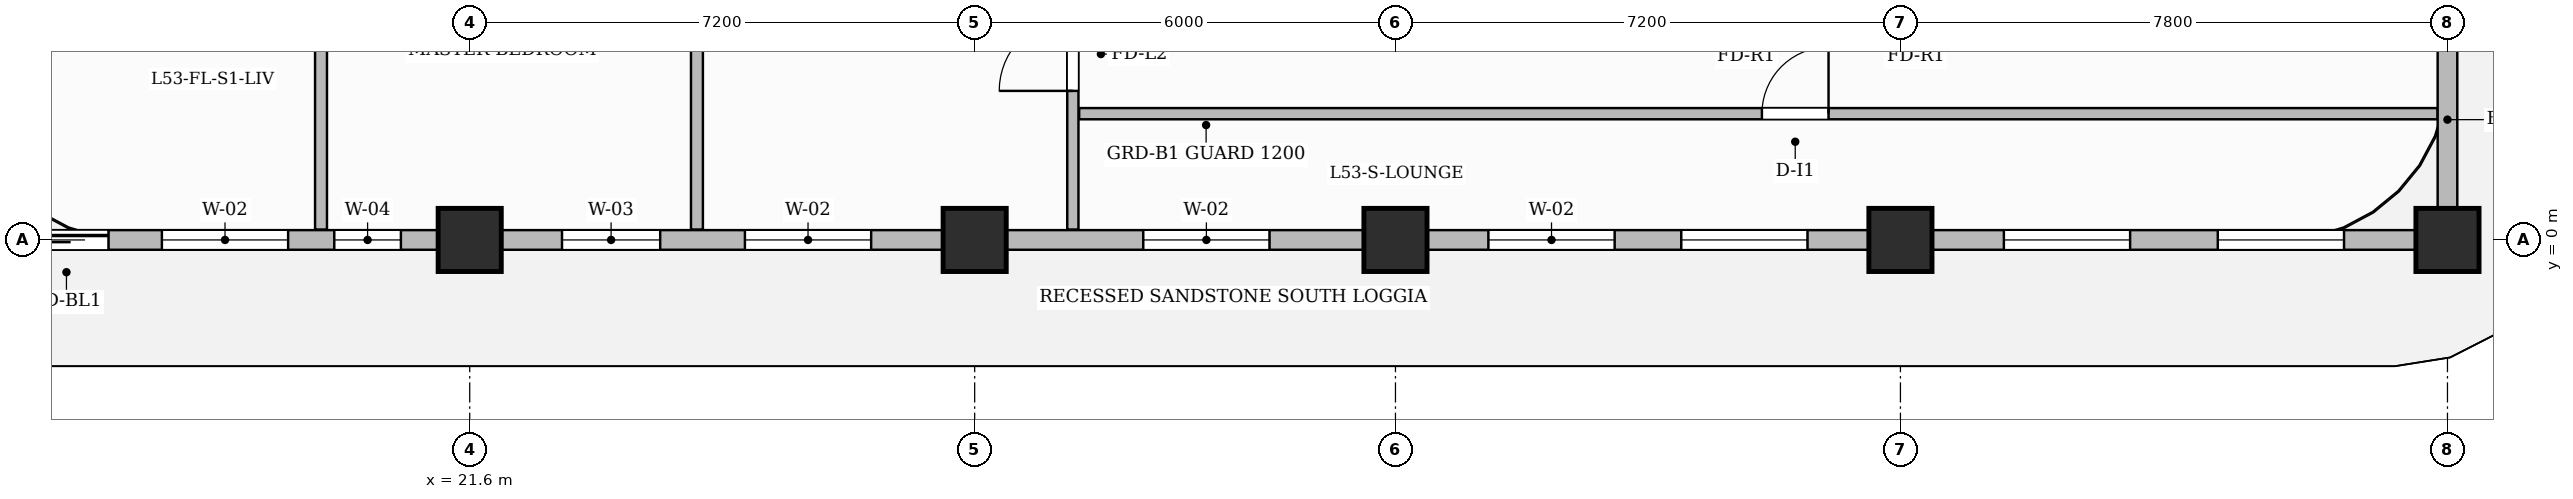
"""IFC4 building model, lengths in metres.
Left out: names, types, materials, properties, quantities, classifications, styles, units other than length and angle.
Written with IfcOpenShell. Run it as: python <this file> out.ifc"""

import sys

from ifc_helpers import new_model, si_unit, direction, frame, frame_2d, origin, origin_2d, place, context, subcontext, project, spatial, rectangle, extrude, source, transform, mapped, element, fill, save


model = new_model("IFC4")
c1 = context("Model", 3, precision=1e-05, world=origin(), true_north=direction((0.0, 1.0)))
c2 = subcontext(c1, "Body", "Model", "MODEL_VIEW")
j1 = project(units=[si_unit("LENGTHUNIT", "METRE"), si_unit("PLANEANGLEUNIT", "RADIAN")], contexts=[c1])
p1 = place(None, origin())
s1 = spatial("IfcSite", under=j1, at=p1, CompositionType="ELEMENT")
p2 = place(p1, origin())
s2 = spatial("IfcBuilding", under=s1, at=p2, CompositionType="ELEMENT")
p3 = place(p2, frame((0.0, 0.0, 213.45)))
s3 = spatial("IfcBuildingStorey", under=s2, at=p3, CompositionType="ELEMENT", Elevation=213.45)
m1 = source(origin(), c2, "Body", "SweptSolid", [
    extrude(rectangle(XDim=0.9, YDim=0.9, at=origin_2d()), origin(), (0.0, 0.0, 1.0), 3.85),
])
for number, where, z_axis, x_axis in (
    (1, (21.6, 0.0, 0.0), (0.0, 0.0, 1.0), (1.0, 0.0, 0.0)),
    (2, (28.8, 0.0, 0.0), (0.0, 0.0, 1.0), (1.0, 0.0, 0.0)),
    (3, (34.8, 0.0, 0.0), (0.0, 0.0, 1.0), (1.0, 0.0, 0.0)),
    (4, (42.0, 0.0, 0.0), (0.0, 0.0, 1.0), (1.0, 0.0, 0.0)),
    (5, (49.8, 0.0, 0.0), (0.0, 0.0, 1.0), (1.0, 0.0, 0.0)),
):
    element("IfcColumn", number, at=place(p3, frame(where, z_axis=z_axis, x_axis=x_axis)), inside=s3, PredefinedType="COLUMN", context=c2, shape_type="MappedRepresentation", body=[
        mapped(m1, transform((0.0, 0.0, 0.0), scale=1.0)),
    ])
p4 = place(p3, frame((30.2, 0.148, 0.0), z_axis=(0.0, 0.0, 1.0), x_axis=(0.0, 1.0, 0.0)))
e6 = element("IfcWall", 6, at=p4, inside=s3, PredefinedType="PARTITIONING", context=c2, shape_type="SweptSolid", body=[
    extrude(rectangle(XDim=8.912, YDim=0.16, at=frame_2d((4.456, 0.0))), origin(), (0.0, 0.0, 1.0), 3.6),
])
p5 = place(p4, frame((1.977, 0.0, 0.0)))
e7 = element("IfcOpeningElement", 7, at=p5, cuts=e6, PredefinedType="OPENING", context=c2, shape_type="SweptSolid", body=[
    extrude(rectangle(XDim=1.05, YDim=2.15, at=frame_2d((0.525, 1.075))), frame((0.0, 0.09, 0.0), z_axis=(0.0, -1.0, 0.0), x_axis=(1.0, 0.0, 0.0)), (0.0, 0.0, 1.0), 0.18),
])
p6 = place(p3, frame((30.29, 1.8, 0.0), z_axis=(0.0, 0.0, 1.0), x_axis=(1.0, 0.0, 0.0)))
e8 = element("IfcWall", 8, at=p6, inside=s3, PredefinedType="PARTITIONING", context=c2, shape_type="SweptSolid", body=[
    extrude(rectangle(XDim=19.37, YDim=0.16, at=frame_2d((9.685, 0.0))), origin(), (0.0, 0.0, 1.0), 3.6),
])
p7 = place(p6, frame((9.735, 0.0, 0.0)))
e9 = element("IfcOpeningElement", 9, at=p7, cuts=e8, PredefinedType="OPENING", context=c2, shape_type="SweptSolid", body=[
    extrude(rectangle(XDim=0.95, YDim=2.15, at=frame_2d((0.475, 1.075))), frame((0.0, 0.09, 0.0), z_axis=(0.0, -1.0, 0.0), x_axis=(1.0, 0.0, 0.0)), (0.0, 0.0, 1.0), 0.18),
])
p8 = place(p3, frame((19.48, 0.148, 0.0), z_axis=(0.0, 0.0, 1.0), x_axis=(0.0, 1.0, 0.0)))
e10 = element("IfcWall", 10, at=p8, inside=s3, PredefinedType="PARTITIONING", context=c2, shape_type="SweptSolid", body=[
    extrude(rectangle(XDim=8.912, YDim=0.17, at=frame_2d((4.456, 0.0))), origin(), (0.0, 0.0, 1.0), 3.6),
])
p9 = place(p8, frame((7.452, 0.0, 0.0)))
e11 = element("IfcOpeningElement", 11, at=p9, cuts=e10, PredefinedType="OPENING", context=c2, shape_type="SweptSolid", body=[
    extrude(rectangle(XDim=0.95, YDim=2.15, at=frame_2d((0.475, 1.075))), frame((0.0, 0.095, 0.0), z_axis=(0.0, -1.0, 0.0), x_axis=(1.0, 0.0, 0.0)), (0.0, 0.0, 1.0), 0.19),
])
p10 = place(p3, frame((24.84, 0.148, 0.0), z_axis=(0.0, 0.0, 1.0), x_axis=(0.0, 1.0, 0.0)))
e12 = element("IfcWall", 12, at=p10, inside=s3, PredefinedType="PARTITIONING", context=c2, shape_type="SweptSolid", body=[
    extrude(rectangle(XDim=6.762, YDim=0.17, at=frame_2d((3.381, 0.0))), origin(), (0.0, 0.0, 1.0), 3.6),
])
p11 = place(p3, frame((14.4, 0.0, 0.0), z_axis=(0.0, 0.0, 1.0), x_axis=(1.0, 0.0, 0.0)))
e13 = element("IfcWall", 13, at=p11, inside=s3, PredefinedType="SOLIDWALL", context=c2, shape_type="SweptSolid", body=[
    extrude(rectangle(XDim=35.4, YDim=0.28, at=frame_2d((17.7, 0.0))), origin(), (0.0, 0.0, 1.0), 3.135),
])
p12 = place(p11, frame((0.85, 0.0, 0.0)))
e14 = element("IfcOpeningElement", 14, at=p12, cuts=e13, PredefinedType="OPENING", context=c2, shape_type="SweptSolid", body=[
    extrude(rectangle(XDim=1.2, YDim=2.2, at=frame_2d((0.6, 1.1))), frame((0.0, 0.15, 0.0), z_axis=(0.0, -1.0, 0.0), x_axis=(1.0, 0.0, 0.0)), (0.0, 0.0, 1.0), 0.3),
])
p13 = place(p11, frame((2.811, 0.0, 0.8)))
e15 = element("IfcOpeningElement", 15, at=p13, cuts=e13, PredefinedType="OPENING", context=c2, shape_type="SweptSolid", body=[
    extrude(rectangle(XDim=1.8, YDim=1.85, at=frame_2d((0.9, 0.925))), frame((0.0, 0.15, 0.0), z_axis=(0.0, -1.0, 0.0), x_axis=(1.0, 0.0, 0.0)), (0.0, 0.0, 1.0), 0.3),
])
p14 = place(p11, frame((5.269, 0.0, 0.8)))
e16 = element("IfcOpeningElement", 16, at=p14, cuts=e13, PredefinedType="OPENING", context=c2, shape_type="SweptSolid", body=[
    extrude(rectangle(XDim=0.95, YDim=1.75, at=frame_2d((0.475, 0.875))), frame((0.0, 0.15, 0.0), z_axis=(0.0, -1.0, 0.0), x_axis=(1.0, 0.0, 0.0)), (0.0, 0.0, 1.0), 0.3),
])
p15 = place(p11, frame((8.516, 0.0, 0.8)))
e17 = element("IfcOpeningElement", 17, at=p15, cuts=e13, PredefinedType="OPENING", context=c2, shape_type="SweptSolid", body=[
    extrude(rectangle(XDim=1.4, YDim=1.85, at=frame_2d((0.7, 0.925))), frame((0.0, 0.15, 0.0), z_axis=(0.0, -1.0, 0.0), x_axis=(1.0, 0.0, 0.0)), (0.0, 0.0, 1.0), 0.3),
])
p16 = place(p11, frame((11.124, 0.0, 0.8)))
e18 = element("IfcOpeningElement", 18, at=p16, cuts=e13, PredefinedType="OPENING", context=c2, shape_type="SweptSolid", body=[
    extrude(rectangle(XDim=1.8, YDim=1.85, at=frame_2d((0.9, 0.925))), frame((0.0, 0.15, 0.0), z_axis=(0.0, -1.0, 0.0), x_axis=(1.0, 0.0, 0.0)), (0.0, 0.0, 1.0), 0.3),
])
p17 = place(p11, frame((16.804, 0.0, 0.8)))
e19 = element("IfcOpeningElement", 19, at=p17, cuts=e13, PredefinedType="OPENING", context=c2, shape_type="SweptSolid", body=[
    extrude(rectangle(XDim=1.8, YDim=1.85, at=frame_2d((0.9, 0.925))), frame((0.0, 0.15, 0.0), z_axis=(0.0, -1.0, 0.0), x_axis=(1.0, 0.0, 0.0)), (0.0, 0.0, 1.0), 0.3),
])
p18 = place(p11, frame((21.725, 0.0, 0.8)))
e20 = element("IfcOpeningElement", 20, at=p18, cuts=e13, PredefinedType="OPENING", context=c2, shape_type="SweptSolid", body=[
    extrude(rectangle(XDim=1.8, YDim=1.85, at=frame_2d((0.9, 0.925))), frame((0.0, 0.15, 0.0), z_axis=(0.0, -1.0, 0.0), x_axis=(1.0, 0.0, 0.0)), (0.0, 0.0, 1.0), 0.3),
])
p19 = place(p11, frame((24.475, 0.0, 0.8)))
e21 = element("IfcOpeningElement", 21, at=p19, cuts=e13, PredefinedType="OPENING", context=c2, shape_type="SweptSolid", body=[
    extrude(rectangle(XDim=1.8, YDim=1.85, at=frame_2d((0.9, 0.925))), frame((0.0, 0.15, 0.0), z_axis=(0.0, -1.0, 0.0), x_axis=(1.0, 0.0, 0.0)), (0.0, 0.0, 1.0), 0.3),
])
p20 = place(p11, frame((29.075, 0.0, 0.8)))
e22 = element("IfcOpeningElement", 22, at=p20, cuts=e13, PredefinedType="OPENING", context=c2, shape_type="SweptSolid", body=[
    extrude(rectangle(XDim=1.8, YDim=1.85, at=frame_2d((0.9, 0.925))), frame((0.0, 0.15, 0.0), z_axis=(0.0, -1.0, 0.0), x_axis=(1.0, 0.0, 0.0)), (0.0, 0.0, 1.0), 0.3),
])
p21 = place(p11, frame((32.125, 0.0, 0.8)))
e23 = element("IfcOpeningElement", 23, at=p21, cuts=e13, PredefinedType="OPENING", context=c2, shape_type="SweptSolid", body=[
    extrude(rectangle(XDim=1.8, YDim=1.85, at=frame_2d((0.9, 0.925))), frame((0.0, 0.15, 0.0), z_axis=(0.0, -1.0, 0.0), x_axis=(1.0, 0.0, 0.0)), (0.0, 0.0, 1.0), 0.3),
])
p22 = place(p3, frame((49.8, 0.05, 0.0), z_axis=(0.0, 0.0, 1.0), x_axis=(0.0, 1.0, 0.0)))
e24 = element("IfcWall", 24, at=p22, inside=s3, PredefinedType="SOLIDWALL", context=c2, shape_type="SweptSolid", body=[
    extrude(rectangle(XDim=3.33, YDim=0.28, at=frame_2d((1.665, 0.0))), origin(), (0.0, 0.0, 1.0), 3.6),
])
m2 = source(origin(), c2, "Body", "SweptSolid", [
    extrude(rectangle(XDim=1.05, YDim=2.15, at=frame_2d((0.525, 1.075))), frame((0.0, 0.025, 0.0), z_axis=(0.0, -1.0, 0.0), x_axis=(1.0, 0.0, 0.0)), (0.0, 0.0, 1.0), 0.05),
])
p23 = place(p5, origin())
e25 = element("IfcDoor", 25, at=p23, inside=s3, OperationType="SINGLE_SWING_LEFT", PredefinedType="DOOR", context=c2, shape_type="MappedRepresentation", body=[
    mapped(m2, transform((0.0, 0.0, 0.0), scale=1.0)),
])
fill(e7, e25)
m3 = source(origin(), c2, "Body", "SweptSolid", [
    extrude(rectangle(XDim=0.95, YDim=2.15, at=frame_2d((0.475, 1.075))), frame((0.0, 0.025, 0.0), z_axis=(0.0, -1.0, 0.0), x_axis=(1.0, 0.0, 0.0)), (0.0, 0.0, 1.0), 0.05),
])
p24 = place(p7, origin())
e26 = element("IfcDoor", 26, at=p24, inside=s3, OperationType="SINGLE_SWING_RIGHT", PredefinedType="DOOR", context=c2, shape_type="MappedRepresentation", body=[
    mapped(m3, transform((0.0, 0.0, 0.0), scale=1.0)),
])
fill(e9, e26)
m4 = source(origin(), c2, "Body", "SweptSolid", [
    extrude(rectangle(XDim=1.2, YDim=2.2, at=frame_2d((0.6, 1.1))), frame((0.0, 0.025, 0.0), z_axis=(0.0, -1.0, 0.0), x_axis=(1.0, 0.0, 0.0)), (0.0, 0.0, 1.0), 0.05),
])
p25 = place(p12, origin())
e27 = element("IfcDoor", 27, at=p25, inside=s3, OperationType="SLIDING_TO_LEFT", PredefinedType="DOOR", context=c2, shape_type="MappedRepresentation", body=[
    mapped(m4, transform((0.0, 0.0, 0.0), scale=1.0)),
])
fill(e14, e27)
m5 = source(origin(), c2, "Body", "SweptSolid", [
    extrude(rectangle(XDim=1.8, YDim=1.85, at=frame_2d((0.9, 0.925))), frame((0.0, 0.03, 0.0), z_axis=(0.0, -1.0, 0.0), x_axis=(1.0, 0.0, 0.0)), (0.0, 0.0, 1.0), 0.06),
])
p26 = place(p13, origin())
e28 = element("IfcWindow", 28, at=p26, inside=s3, PartitioningType="DOUBLE_PANEL_VERTICAL", PredefinedType="WINDOW", context=c2, shape_type="MappedRepresentation", body=[
    mapped(m5, transform((0.0, 0.0, 0.0), scale=1.0)),
])
fill(e15, e28)
m6 = source(origin(), c2, "Body", "SweptSolid", [
    extrude(rectangle(XDim=0.95, YDim=1.75, at=frame_2d((0.475, 0.875))), frame((0.0, 0.03, 0.0), z_axis=(0.0, -1.0, 0.0), x_axis=(1.0, 0.0, 0.0)), (0.0, 0.0, 1.0), 0.06),
])
p27 = place(p14, origin())
e29 = element("IfcWindow", 29, at=p27, inside=s3, PartitioningType="SINGLE_PANEL", PredefinedType="WINDOW", context=c2, shape_type="MappedRepresentation", body=[
    mapped(m6, transform((0.0, 0.0, 0.0), scale=1.0)),
])
fill(e16, e29)
m7 = source(origin(), c2, "Body", "SweptSolid", [
    extrude(rectangle(XDim=1.4, YDim=1.85, at=frame_2d((0.7, 0.925))), frame((0.0, 0.03, 0.0), z_axis=(0.0, -1.0, 0.0), x_axis=(1.0, 0.0, 0.0)), (0.0, 0.0, 1.0), 0.06),
])
p28 = place(p15, origin())
e30 = element("IfcWindow", 30, at=p28, inside=s3, PartitioningType="SINGLE_PANEL", PredefinedType="WINDOW", context=c2, shape_type="MappedRepresentation", body=[
    mapped(m7, transform((0.0, 0.0, 0.0), scale=1.0)),
])
fill(e17, e30)
p29 = place(p16, origin())
e31 = element("IfcWindow", 31, at=p29, inside=s3, PartitioningType="DOUBLE_PANEL_VERTICAL", PredefinedType="WINDOW", context=c2, shape_type="MappedRepresentation", body=[
    mapped(m5, transform((0.0, 0.0, 0.0), scale=1.0)),
])
fill(e18, e31)
p30 = place(p17, origin())
e32 = element("IfcWindow", 32, at=p30, inside=s3, PartitioningType="DOUBLE_PANEL_VERTICAL", PredefinedType="WINDOW", context=c2, shape_type="MappedRepresentation", body=[
    mapped(m5, transform((0.0, 0.0, 0.0), scale=1.0)),
])
fill(e19, e32)
p31 = place(p18, origin())
e33 = element("IfcWindow", 33, at=p31, inside=s3, PartitioningType="DOUBLE_PANEL_VERTICAL", PredefinedType="WINDOW", context=c2, shape_type="MappedRepresentation", body=[
    mapped(m5, transform((0.0, 0.0, 0.0), scale=1.0)),
])
fill(e20, e33)
p32 = place(p19, origin())
e34 = element("IfcWindow", 34, at=p32, inside=s3, PartitioningType="DOUBLE_PANEL_VERTICAL", PredefinedType="WINDOW", context=c2, shape_type="MappedRepresentation", body=[
    mapped(m5, transform((0.0, 0.0, 0.0), scale=1.0)),
])
fill(e21, e34)
p33 = place(p20, origin())
e35 = element("IfcWindow", 35, at=p33, inside=s3, PartitioningType="DOUBLE_PANEL_VERTICAL", PredefinedType="WINDOW", context=c2, shape_type="MappedRepresentation", body=[
    mapped(m5, transform((0.0, 0.0, 0.0), scale=1.0)),
])
fill(e22, e35)
p34 = place(p21, origin())
e36 = element("IfcWindow", 36, at=p34, inside=s3, PartitioningType="DOUBLE_PANEL_VERTICAL", PredefinedType="WINDOW", context=c2, shape_type="MappedRepresentation", body=[
    mapped(m5, transform((0.0, 0.0, 0.0), scale=1.0)),
])
fill(e23, e36)
save(model, sys.argv[1])
